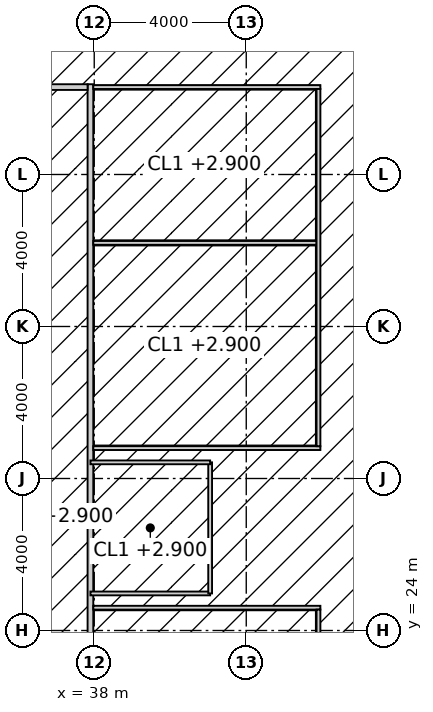
"""IFC4 building model, lengths in metres.
Left out: names, types, materials, properties, quantities, classifications, styles, units other than length and angle.
Written with IfcOpenShell. Run it as: python <this file> out.ifc"""

import sys

from ifc_helpers import new_model, si_unit, direction, frame, frame_2d, origin, place, context, subcontext, project, spatial, rectangle, extrude, element, fill, save


model = new_model("IFC4")
c1 = context("Model", 3, precision=1e-05, world=origin(), true_north=direction((0.0, 1.0)))
c2 = subcontext(c1, "Body", "Model", "MODEL_VIEW")
j1 = project(units=[si_unit("LENGTHUNIT", "METRE"), si_unit("PLANEANGLEUNIT", "RADIAN")], contexts=[c1])
p1 = place(None, origin())
s1 = spatial("IfcSite", under=j1, at=p1, CompositionType="ELEMENT")
p2 = place(p1, origin())
s2 = spatial("IfcBuilding", under=s1, at=p2, CompositionType="ELEMENT")
p3 = place(p2, frame((0.0, 0.0, 113.4)))
s3 = spatial("IfcBuildingStorey", under=s2, at=p3, CompositionType="ELEMENT", Elevation=113.4)
p4 = place(p3, frame((37.9, 15.025, 0.0), z_axis=(0.0, 0.0, 1.0), x_axis=(0.0, 1.0, 0.0)))
e1 = element("IfcWall", 1, at=p4, inside=s3, PredefinedType="PARTITIONING", context=c2, shape_type="SweptSolid", body=[
    extrude(rectangle(XDim=23.35, YDim=0.15, at=frame_2d((11.675, 0.0))), origin(), (0.0, 0.0, 1.0), 2.95),
])
p5 = place(p4, frame((10.775, 0.0, 0.0)))
e2 = element("IfcOpeningElement", 2, at=p5, cuts=e1, PredefinedType="OPENING", context=c2, shape_type="SweptSolid", body=[
    extrude(rectangle(XDim=1.8, YDim=2.4, at=frame_2d((0.9, 1.2))), frame((0.0, 0.085, 0.0), z_axis=(0.0, -1.0, 0.0), x_axis=(1.0, 0.0, 0.0)), (0.0, 0.0, 1.0), 0.17),
])
p6 = place(p3, frame((17.5, 38.3, 0.0), z_axis=(0.0, 0.0, 1.0), x_axis=(1.0, 0.0, 0.0)))
e3 = element("IfcWall", 3, at=p6, inside=s3, PredefinedType="PARTITIONING", context=c2, shape_type="SweptSolid", body=[
    extrude(rectangle(XDim=20.325, YDim=0.15, at=frame_2d((10.163, 0.0))), origin(), (0.0, 0.0, 1.0), 3.85),
])
p7 = place(p6, frame((6.25, 0.0, 0.0)))
e4 = element("IfcOpeningElement", 4, at=p7, cuts=e3, PredefinedType="OPENING", context=c2, shape_type="SweptSolid", body=[
    extrude(rectangle(XDim=0.9, YDim=2.1, at=frame_2d((0.45, 1.05))), frame((0.0, 0.085, 0.0), z_axis=(0.0, -1.0, 0.0), x_axis=(1.0, 0.0, 0.0)), (0.0, 0.0, 1.0), 0.17),
])
p8 = place(p6, frame((10.0, 0.0, 0.0)))
e5 = element("IfcOpeningElement", 5, at=p8, cuts=e3, PredefinedType="OPENING", context=c2, shape_type="SweptSolid", body=[
    extrude(rectangle(XDim=1.0, YDim=2.1, at=frame_2d((0.5, 1.05))), frame((0.0, 0.085, 0.0), z_axis=(0.0, -1.0, 0.0), x_axis=(1.0, 0.0, 0.0)), (0.0, 0.0, 1.0), 0.17),
])
p9 = place(p6, frame((13.85, 0.0, 0.0)))
e6 = element("IfcOpeningElement", 6, at=p9, cuts=e3, PredefinedType="OPENING", context=c2, shape_type="SweptSolid", body=[
    extrude(rectangle(XDim=0.9, YDim=2.1, at=frame_2d((0.45, 1.05))), frame((0.0, 0.085, 0.0), z_axis=(0.0, -1.0, 0.0), x_axis=(1.0, 0.0, 0.0)), (0.0, 0.0, 1.0), 0.17),
])
for number, where, z_axis, x_axis in (
    (7, (37.975, 24.6, 0.0), (0.0, 0.0, 1.0), (1.0, 0.0, 0.0)),
    (8, (37.975, 28.8, 0.0), (0.0, 0.0, 1.0), (1.0, 0.0, 0.0)),
):
    element("IfcWall", number, at=place(p3, frame(where, z_axis=z_axis, x_axis=x_axis)), inside=s3, PredefinedType="PARTITIONING", context=c2, shape_type="SweptSolid", body=[
        extrude(rectangle(XDim=5.975, YDim=0.1, at=frame_2d((2.987, 0.0))), origin(), (0.0, 0.0, 1.0), 3.85),
    ])
p10 = place(p3, frame((37.975, 34.2, 0.0), z_axis=(0.0, 0.0, 1.0), x_axis=(1.0, 0.0, 0.0)))
e9 = element("IfcWall", 9, at=p10, inside=s3, PredefinedType="PARTITIONING", context=c2, shape_type="SweptSolid", body=[
    extrude(rectangle(XDim=5.875, YDim=0.1, at=frame_2d((2.938, 0.0))), origin(), (0.0, 0.0, 1.0), 3.85),
])
p11 = place(p3, frame((37.975, 38.3, 0.0), z_axis=(0.0, 0.0, 1.0), x_axis=(1.0, 0.0, 0.0)))
e10 = element("IfcWall", 10, at=p11, inside=s3, PredefinedType="PARTITIONING", context=c2, shape_type="SweptSolid", body=[
    extrude(rectangle(XDim=5.975, YDim=0.1, at=frame_2d((2.987, 0.0))), origin(), (0.0, 0.0, 1.0), 3.85),
])
p12 = place(p3, frame((43.9, 16.15, 0.0), z_axis=(0.0, 0.0, 1.0), x_axis=(0.0, 1.0, 0.0)))
e11 = element("IfcWall", 11, at=p12, inside=s3, PredefinedType="PARTITIONING", context=c2, shape_type="SweptSolid", body=[
    extrude(rectangle(XDim=8.4, YDim=0.1, at=frame_2d((4.2, 0.0))), origin(), (0.0, 0.0, 1.0), 3.85),
])
p13 = place(p12, frame((3.3, 0.0, 0.0)))
e12 = element("IfcOpeningElement", 12, at=p13, cuts=e11, PredefinedType="OPENING", context=c2, shape_type="SweptSolid", body=[
    extrude(rectangle(XDim=1.8, YDim=2.4, at=frame_2d((0.9, 1.2))), frame((0.0, 0.06, 0.0), z_axis=(0.0, -1.0, 0.0), x_axis=(1.0, 0.0, 0.0)), (0.0, 0.0, 1.0), 0.12),
])
p14 = place(p3, frame((43.9, 28.85, 0.0), z_axis=(0.0, 0.0, 1.0), x_axis=(0.0, 1.0, 0.0)))
e13 = element("IfcWall", 13, at=p14, inside=s3, PredefinedType="PARTITIONING", context=c2, shape_type="SweptSolid", body=[
    extrude(rectangle(XDim=9.4, YDim=0.1, at=frame_2d((4.7, 0.0))), origin(), (0.0, 0.0, 1.0), 3.85),
])
p15 = place(p14, frame((2.15, 0.0, 0.0)))
e14 = element("IfcOpeningElement", 14, at=p15, cuts=e13, PredefinedType="OPENING", context=c2, shape_type="SweptSolid", body=[
    extrude(rectangle(XDim=1.0, YDim=2.2, at=frame_2d((0.5, 1.1))), frame((0.0, 0.06, 0.0), z_axis=(0.0, -1.0, 0.0), x_axis=(1.0, 0.0, 0.0)), (0.0, 0.0, 1.0), 0.12),
])
p16 = place(p14, frame((6.9, 0.0, 0.0)))
e15 = element("IfcOpeningElement", 15, at=p16, cuts=e13, PredefinedType="OPENING", context=c2, shape_type="SweptSolid", body=[
    extrude(rectangle(XDim=1.0, YDim=2.2, at=frame_2d((0.5, 1.1))), frame((0.0, 0.06, 0.0), z_axis=(0.0, -1.0, 0.0), x_axis=(1.0, 0.0, 0.0)), (0.0, 0.0, 1.0), 0.12),
])
p17 = place(p3, frame((37.9, 24.975, 0.0), z_axis=(0.0, 0.0, 1.0), x_axis=(1.0, 0.0, 0.0)))
e16 = element("IfcWall", 16, at=p17, inside=s3, PredefinedType="PARTITIONING", context=c2, shape_type="SweptSolid", body=[
    extrude(rectangle(XDim=3.15, YDim=0.1, at=frame_2d((1.575, 0.0))), origin(), (0.0, 0.0, 1.0), 3.85),
])
p18 = place(p3, frame((41.05, 24.975, 0.0), z_axis=(0.0, 0.0, 1.0), x_axis=(0.0, 1.0, 0.0)))
e17 = element("IfcWall", 17, at=p18, inside=s3, PredefinedType="PARTITIONING", context=c2, shape_type="SweptSolid", body=[
    extrude(rectangle(XDim=3.45, YDim=0.1, at=frame_2d((1.725, 0.0))), origin(), (0.0, 0.0, 1.0), 3.85),
])
p19 = place(p18, frame((1.225, 0.0, 0.0)))
e18 = element("IfcOpeningElement", 18, at=p19, cuts=e17, PredefinedType="OPENING", context=c2, shape_type="SweptSolid", body=[
    extrude(rectangle(XDim=1.0, YDim=2.2, at=frame_2d((0.5, 1.1))), frame((0.0, 0.06, 0.0), z_axis=(0.0, -1.0, 0.0), x_axis=(1.0, 0.0, 0.0)), (0.0, 0.0, 1.0), 0.12),
])
p20 = place(p3, frame((41.05, 28.425, 0.0), z_axis=(0.0, 0.0, 1.0), x_axis=(-1.0, 0.0, 0.0)))
e19 = element("IfcWall", 19, at=p20, inside=s3, PredefinedType="PARTITIONING", context=c2, shape_type="SweptSolid", body=[
    extrude(rectangle(XDim=3.15, YDim=0.1, at=frame_2d((1.575, 0.0))), origin(), (0.0, 0.0, 1.0), 3.85),
])
p21 = place(p5, origin())
e20 = element("IfcDoor", 20, at=p21, inside=s3, OperationType="DOUBLE_DOOR_DOUBLE_SWING", PredefinedType="DOOR", context=c2, shape_type="SweptSolid", body=[
    extrude(rectangle(XDim=1.8, YDim=2.4, at=frame_2d((0.9, 1.2))), frame((0.0, 0.025, 0.0), z_axis=(0.0, -1.0, 0.0), x_axis=(1.0, 0.0, 0.0)), (0.0, 0.0, 1.0), 0.05),
])
fill(e2, e20)
p22 = place(p15, origin())
e21 = element("IfcDoor", 21, at=p22, inside=s3, OperationType="SINGLE_SWING_RIGHT", PredefinedType="DOOR", context=c2, shape_type="SweptSolid", body=[
    extrude(rectangle(XDim=1.0, YDim=2.2, at=frame_2d((0.5, 1.1))), frame((0.0, 0.025, 0.0), z_axis=(0.0, -1.0, 0.0), x_axis=(1.0, 0.0, 0.0)), (0.0, 0.0, 1.0), 0.05),
])
fill(e14, e21)
p23 = place(p16, origin())
e22 = element("IfcDoor", 22, at=p23, inside=s3, OperationType="SINGLE_SWING_LEFT", PredefinedType="DOOR", context=c2, shape_type="SweptSolid", body=[
    extrude(rectangle(XDim=1.0, YDim=2.2, at=frame_2d((0.5, 1.1))), frame((0.0, 0.025, 0.0), z_axis=(0.0, -1.0, 0.0), x_axis=(1.0, 0.0, 0.0)), (0.0, 0.0, 1.0), 0.05),
])
fill(e15, e22)
p24 = place(p19, origin())
e23 = element("IfcDoor", 23, at=p24, inside=s3, OperationType="SINGLE_SWING_RIGHT", PredefinedType="DOOR", context=c2, shape_type="SweptSolid", body=[
    extrude(rectangle(XDim=1.0, YDim=2.2, at=frame_2d((0.5, 1.1))), frame((0.0, 0.025, 0.0), z_axis=(0.0, -1.0, 0.0), x_axis=(1.0, 0.0, 0.0)), (0.0, 0.0, 1.0), 0.05),
])
fill(e18, e23)
save(model, sys.argv[1])
